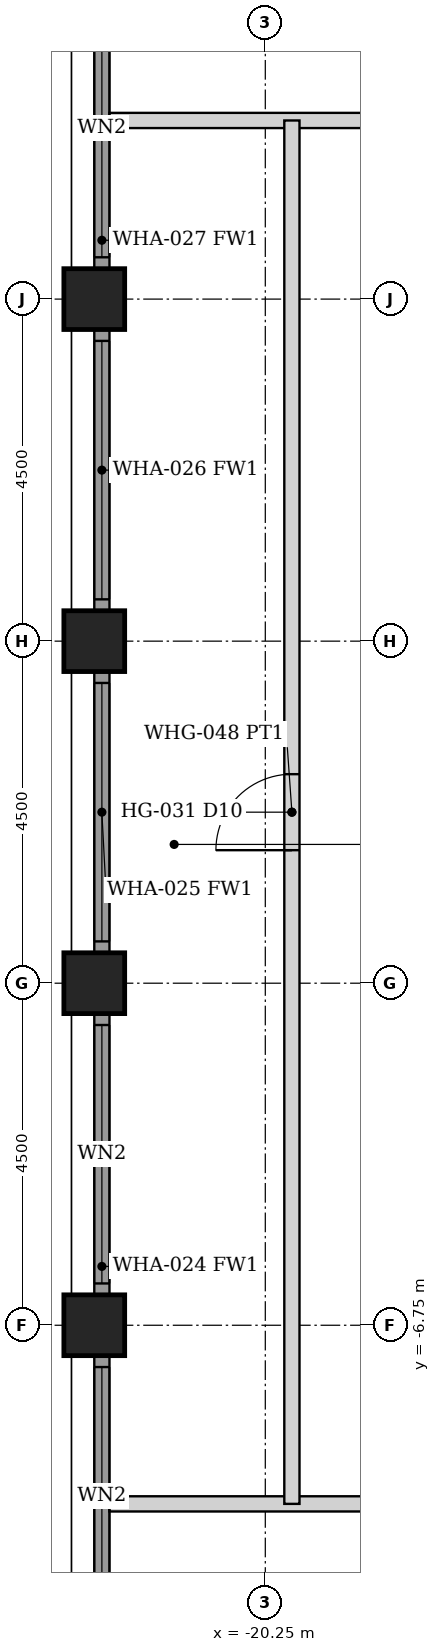
"""IFC4 building model, lengths in metres.
Left out: names, types, materials, properties, quantities, classifications, styles, units other than length and angle.
Written with IfcOpenShell. Run it as: python <this file> out.ifc"""

import sys

from ifc_helpers import new_model, si_unit, direction, frame, frame_2d, origin, origin_2d, place, context, subcontext, project, spatial, rectangle, hollow_rectangle, extrude, element, fill, save


model = new_model("IFC4")
c1 = context("Model", 3, precision=1e-05, world=origin(), true_north=direction((0.0, 1.0)))
c2 = subcontext(c1, "Body", "Model", "MODEL_VIEW")
j1 = project(units=[si_unit("LENGTHUNIT", "METRE"), si_unit("PLANEANGLEUNIT", "RADIAN")], contexts=[c1])
p1 = place(None, origin())
s1 = spatial("IfcSite", under=j1, at=p1, CompositionType="ELEMENT")
p2 = place(p1, origin())
s2 = spatial("IfcBuilding", under=s1, at=p2, CompositionType="ELEMENT")
p3 = place(p2, frame((0.0, 0.0, 183.2)))
s3 = spatial("IfcBuildingStorey", under=s2, at=p3, CompositionType="ELEMENT", Elevation=183.2)
for number, where, z_axis, x_axis in (
    (1, (-22.5, -6.75, 0.0), (0.0, 0.0, 1.0), (1.0, 0.0, 0.0)),
    (2, (-22.5, -2.25, 0.0), (0.0, 0.0, 1.0), (1.0, 0.0, 0.0)),
    (3, (-22.5, 2.25, 0.0), (0.0, 0.0, 1.0), (1.0, 0.0, 0.0)),
    (4, (-22.5, 6.75, 0.0), (0.0, 0.0, 1.0), (1.0, 0.0, 0.0)),
):
    element("IfcColumn", number, at=place(p3, frame(where, z_axis=z_axis, x_axis=x_axis)), inside=s3, PredefinedType="COLUMN", context=c2, shape_type="SweptSolid", body=[
        extrude(hollow_rectangle(XDim=0.8, YDim=0.8, WallThickness=0.045, at=origin_2d()), origin(), (0.0, 0.0, 1.0), 3.6),
    ])
p4 = place(p3, frame((-22.4, -10.845, 0.0), z_axis=(0.0, 0.0, 1.0), x_axis=(0.0, 1.0, 0.0)))
e5 = element("IfcWall", 5, at=p4, inside=s3, PredefinedType="SOLIDWALL", context=c2, shape_type="SweptSolid", body=[
    extrude(rectangle(XDim=3.69, YDim=0.2, at=frame_2d((1.845, 0.0))), origin(), (0.0, 0.0, 1.0), 2.479),
])
p5 = place(p4, frame((0.145, 0.0, 0.3)))
e6 = element("IfcOpeningElement", 6, at=p5, cuts=e5, PredefinedType="OPENING", context=c2, shape_type="SweptSolid", body=[
    extrude(rectangle(XDim=3.4, YDim=2.029, at=frame_2d((1.7, 1.015))), frame((0.0, 0.11, 0.0), z_axis=(0.0, -1.0, 0.0), x_axis=(1.0, 0.0, 0.0)), (0.0, 0.0, 1.0), 0.22),
])
p6 = place(p3, frame((-22.4, -6.345, 0.0), z_axis=(0.0, 0.0, 1.0), x_axis=(0.0, 1.0, 0.0)))
e7 = element("IfcWall", 7, at=p6, inside=s3, PredefinedType="SOLIDWALL", context=c2, shape_type="SweptSolid", body=[
    extrude(rectangle(XDim=3.69, YDim=0.2, at=frame_2d((1.845, 0.0))), origin(), (0.0, 0.0, 1.0), 2.479),
])
p7 = place(p6, frame((0.145, 0.0, 0.3)))
e8 = element("IfcOpeningElement", 8, at=p7, cuts=e7, PredefinedType="OPENING", context=c2, shape_type="SweptSolid", body=[
    extrude(rectangle(XDim=3.4, YDim=2.029, at=frame_2d((1.7, 1.015))), frame((0.0, 0.11, 0.0), z_axis=(0.0, -1.0, 0.0), x_axis=(1.0, 0.0, 0.0)), (0.0, 0.0, 1.0), 0.22),
])
p8 = place(p3, frame((-22.4, -1.845, 0.0), z_axis=(0.0, 0.0, 1.0), x_axis=(0.0, 1.0, 0.0)))
e9 = element("IfcWall", 9, at=p8, inside=s3, PredefinedType="SOLIDWALL", context=c2, shape_type="SweptSolid", body=[
    extrude(rectangle(XDim=3.69, YDim=0.2, at=frame_2d((1.845, 0.0))), origin(), (0.0, 0.0, 1.0), 2.479),
])
p9 = place(p8, frame((0.145, 0.0, 0.3)))
e10 = element("IfcOpeningElement", 10, at=p9, cuts=e9, PredefinedType="OPENING", context=c2, shape_type="SweptSolid", body=[
    extrude(rectangle(XDim=3.4, YDim=2.029, at=frame_2d((1.7, 1.015))), frame((0.0, 0.11, 0.0), z_axis=(0.0, -1.0, 0.0), x_axis=(1.0, 0.0, 0.0)), (0.0, 0.0, 1.0), 0.22),
])
p10 = place(p3, frame((-22.4, 2.655, 0.0), z_axis=(0.0, 0.0, 1.0), x_axis=(0.0, 1.0, 0.0)))
e11 = element("IfcWall", 11, at=p10, inside=s3, PredefinedType="SOLIDWALL", context=c2, shape_type="SweptSolid", body=[
    extrude(rectangle(XDim=3.69, YDim=0.2, at=frame_2d((1.845, 0.0))), origin(), (0.0, 0.0, 1.0), 2.479),
])
p11 = place(p10, frame((0.145, 0.0, 0.3)))
e12 = element("IfcOpeningElement", 12, at=p11, cuts=e11, PredefinedType="OPENING", context=c2, shape_type="SweptSolid", body=[
    extrude(rectangle(XDim=3.4, YDim=2.029, at=frame_2d((1.7, 1.015))), frame((0.0, 0.11, 0.0), z_axis=(0.0, -1.0, 0.0), x_axis=(1.0, 0.0, 0.0)), (0.0, 0.0, 1.0), 0.22),
])
p12 = place(p3, frame((-22.4, 7.155, 0.0), z_axis=(0.0, 0.0, 1.0), x_axis=(0.0, 1.0, 0.0)))
e13 = element("IfcWall", 13, at=p12, inside=s3, PredefinedType="SOLIDWALL", context=c2, shape_type="SweptSolid", body=[
    extrude(rectangle(XDim=3.69, YDim=0.2, at=frame_2d((1.845, 0.0))), origin(), (0.0, 0.0, 1.0), 2.479),
])
p13 = place(p12, frame((0.145, 0.0, 0.3)))
e14 = element("IfcOpeningElement", 14, at=p13, cuts=e13, PredefinedType="OPENING", context=c2, shape_type="SweptSolid", body=[
    extrude(rectangle(XDim=3.4, YDim=2.029, at=frame_2d((1.7, 1.015))), frame((0.0, 0.11, 0.0), z_axis=(0.0, -1.0, 0.0), x_axis=(1.0, 0.0, 0.0)), (0.0, 0.0, 1.0), 0.22),
])
p14 = place(p3, frame((-22.3, 9.1, 0.0), z_axis=(0.0, 0.0, 1.0), x_axis=(1.0, 0.0, 0.0)))
e15 = element("IfcWall", 15, at=p14, inside=s3, PredefinedType="PARTITIONING", context=c2, shape_type="SweptSolid", body=[
    extrude(rectangle(XDim=44.6, YDim=0.2, at=frame_2d((22.3, 0.0))), origin(), (0.0, 0.0, 1.0), 2.473),
])
p15 = place(p14, frame((11.35, 0.0, 0.0)))
e16 = element("IfcOpeningElement", 16, at=p15, cuts=e15, PredefinedType="OPENING", context=c2, shape_type="SweptSolid", body=[
    extrude(rectangle(XDim=0.9, YDim=2.1, at=frame_2d((0.45, 1.05))), frame((0.0, 0.11, 0.0), z_axis=(0.0, -1.0, 0.0), x_axis=(1.0, 0.0, 0.0)), (0.0, 0.0, 1.0), 0.22),
])
p16 = place(p14, frame((15.75, 0.0, 0.0)))
e17 = element("IfcOpeningElement", 17, at=p16, cuts=e15, PredefinedType="OPENING", context=c2, shape_type="SweptSolid", body=[
    extrude(rectangle(XDim=0.9, YDim=2.1, at=frame_2d((0.45, 1.05))), frame((0.0, 0.11, 0.0), z_axis=(0.0, -1.0, 0.0), x_axis=(1.0, 0.0, 0.0)), (0.0, 0.0, 1.0), 0.22),
])
p17 = place(p14, frame((23.45, 0.0, 0.0)))
e18 = element("IfcOpeningElement", 18, at=p17, cuts=e15, PredefinedType="OPENING", context=c2, shape_type="SweptSolid", body=[
    extrude(rectangle(XDim=0.9, YDim=2.1, at=frame_2d((0.45, 1.05))), frame((0.0, 0.11, 0.0), z_axis=(0.0, -1.0, 0.0), x_axis=(1.0, 0.0, 0.0)), (0.0, 0.0, 1.0), 0.22),
])
p18 = place(p14, frame((24.75, 0.0, 0.0)))
e19 = element("IfcOpeningElement", 19, at=p18, cuts=e15, PredefinedType="OPENING", context=c2, shape_type="SweptSolid", body=[
    extrude(rectangle(XDim=0.9, YDim=2.1, at=frame_2d((0.45, 1.05))), frame((0.0, 0.11, 0.0), z_axis=(0.0, -1.0, 0.0), x_axis=(1.0, 0.0, 0.0)), (0.0, 0.0, 1.0), 0.22),
])
p19 = place(p14, frame((29.35, 0.0, 0.0)))
e20 = element("IfcOpeningElement", 20, at=p19, cuts=e15, PredefinedType="OPENING", context=c2, shape_type="SweptSolid", body=[
    extrude(rectangle(XDim=0.9, YDim=2.1, at=frame_2d((0.45, 1.05))), frame((0.0, 0.11, 0.0), z_axis=(0.0, -1.0, 0.0), x_axis=(1.0, 0.0, 0.0)), (0.0, 0.0, 1.0), 0.22),
])
p20 = place(p14, frame((38.85, 0.0, 0.0)))
e21 = element("IfcOpeningElement", 21, at=p20, cuts=e15, PredefinedType="OPENING", context=c2, shape_type="SweptSolid", body=[
    extrude(rectangle(XDim=0.9, YDim=2.1, at=frame_2d((0.45, 1.05))), frame((0.0, 0.11, 0.0), z_axis=(0.0, -1.0, 0.0), x_axis=(1.0, 0.0, 0.0)), (0.0, 0.0, 1.0), 0.22),
])
p21 = place(p14, frame((4.85, 0.0, 0.0)))
e22 = element("IfcOpeningElement", 22, at=p21, cuts=e15, PredefinedType="OPENING", context=c2, shape_type="SweptSolid", body=[
    extrude(rectangle(XDim=0.9, YDim=2.1, at=frame_2d((0.45, 1.05))), frame((0.0, 0.11, 0.0), z_axis=(0.0, -1.0, 0.0), x_axis=(1.0, 0.0, 0.0)), (0.0, 0.0, 1.0), 0.22),
])
p22 = place(p3, frame((-22.3, -9.1, 0.0), z_axis=(0.0, 0.0, 1.0), x_axis=(1.0, 0.0, 0.0)))
e23 = element("IfcWall", 23, at=p22, inside=s3, PredefinedType="PARTITIONING", context=c2, shape_type="SweptSolid", body=[
    extrude(rectangle(XDim=44.6, YDim=0.2, at=frame_2d((22.3, 0.0))), origin(), (0.0, 0.0, 1.0), 2.473),
])
p23 = place(p22, frame((11.35, 0.0, 0.0)))
e24 = element("IfcOpeningElement", 24, at=p23, cuts=e23, PredefinedType="OPENING", context=c2, shape_type="SweptSolid", body=[
    extrude(rectangle(XDim=0.9, YDim=2.1, at=frame_2d((0.45, 1.05))), frame((0.0, 0.11, 0.0), z_axis=(0.0, -1.0, 0.0), x_axis=(1.0, 0.0, 0.0)), (0.0, 0.0, 1.0), 0.22),
])
p24 = place(p22, frame((15.75, 0.0, 0.0)))
e25 = element("IfcOpeningElement", 25, at=p24, cuts=e23, PredefinedType="OPENING", context=c2, shape_type="SweptSolid", body=[
    extrude(rectangle(XDim=0.9, YDim=2.1, at=frame_2d((0.45, 1.05))), frame((0.0, 0.11, 0.0), z_axis=(0.0, -1.0, 0.0), x_axis=(1.0, 0.0, 0.0)), (0.0, 0.0, 1.0), 0.22),
])
p25 = place(p22, frame((23.45, 0.0, 0.0)))
e26 = element("IfcOpeningElement", 26, at=p25, cuts=e23, PredefinedType="OPENING", context=c2, shape_type="SweptSolid", body=[
    extrude(rectangle(XDim=0.9, YDim=2.1, at=frame_2d((0.45, 1.05))), frame((0.0, 0.11, 0.0), z_axis=(0.0, -1.0, 0.0), x_axis=(1.0, 0.0, 0.0)), (0.0, 0.0, 1.0), 0.22),
])
p26 = place(p22, frame((24.75, 0.0, 0.0)))
e27 = element("IfcOpeningElement", 27, at=p26, cuts=e23, PredefinedType="OPENING", context=c2, shape_type="SweptSolid", body=[
    extrude(rectangle(XDim=0.9, YDim=2.1, at=frame_2d((0.45, 1.05))), frame((0.0, 0.11, 0.0), z_axis=(0.0, -1.0, 0.0), x_axis=(1.0, 0.0, 0.0)), (0.0, 0.0, 1.0), 0.22),
])
p27 = place(p22, frame((29.25, 0.0, 0.0)))
e28 = element("IfcOpeningElement", 28, at=p27, cuts=e23, PredefinedType="OPENING", context=c2, shape_type="SweptSolid", body=[
    extrude(rectangle(XDim=0.9, YDim=2.1, at=frame_2d((0.45, 1.05))), frame((0.0, 0.11, 0.0), z_axis=(0.0, -1.0, 0.0), x_axis=(1.0, 0.0, 0.0)), (0.0, 0.0, 1.0), 0.22),
])
p28 = place(p22, frame((38.85, 0.0, 0.0)))
e29 = element("IfcOpeningElement", 29, at=p28, cuts=e23, PredefinedType="OPENING", context=c2, shape_type="SweptSolid", body=[
    extrude(rectangle(XDim=0.9, YDim=2.1, at=frame_2d((0.45, 1.05))), frame((0.0, 0.11, 0.0), z_axis=(0.0, -1.0, 0.0), x_axis=(1.0, 0.0, 0.0)), (0.0, 0.0, 1.0), 0.22),
])
p29 = place(p22, frame((4.85, 0.0, 0.0)))
e30 = element("IfcOpeningElement", 30, at=p29, cuts=e23, PredefinedType="OPENING", context=c2, shape_type="SweptSolid", body=[
    extrude(rectangle(XDim=0.9, YDim=2.1, at=frame_2d((0.45, 1.05))), frame((0.0, 0.11, 0.0), z_axis=(0.0, -1.0, 0.0), x_axis=(1.0, 0.0, 0.0)), (0.0, 0.0, 1.0), 0.22),
])
p30 = place(p3, frame((-19.9, -9.1, 0.0), z_axis=(0.0, 0.0, 1.0), x_axis=(0.0, 1.0, 0.0)))
e31 = element("IfcWall", 31, at=p30, inside=s3, PredefinedType="PARTITIONING", context=c2, shape_type="SweptSolid", body=[
    extrude(rectangle(XDim=18.2, YDim=0.2, at=frame_2d((9.1, 0.0))), origin(), (0.0, 0.0, 1.0), 2.473),
])
p31 = place(p30, frame((8.6, 0.0, 0.0)))
e32 = element("IfcOpeningElement", 32, at=p31, cuts=e31, PredefinedType="OPENING", context=c2, shape_type="SweptSolid", body=[
    extrude(rectangle(XDim=1.0, YDim=2.1, at=frame_2d((0.5, 1.05))), frame((0.0, 0.11, 0.0), z_axis=(0.0, -1.0, 0.0), x_axis=(1.0, 0.0, 0.0)), (0.0, 0.0, 1.0), 0.22),
])
p32 = place(p5, origin())
e33 = element("IfcWindow", 33, at=p32, inside=s3, PartitioningType="SINGLE_PANEL", PredefinedType="WINDOW", context=c2, shape_type="SweptSolid", body=[
    extrude(rectangle(XDim=3.4, YDim=2.029, at=frame_2d((1.7, 1.015))), frame((0.0, 0.03, 0.0), z_axis=(0.0, -1.0, 0.0), x_axis=(1.0, 0.0, 0.0)), (0.0, 0.0, 1.0), 0.06),
])
fill(e6, e33)
p33 = place(p7, origin())
e34 = element("IfcWindow", 34, at=p33, inside=s3, PartitioningType="SINGLE_PANEL", PredefinedType="WINDOW", context=c2, shape_type="SweptSolid", body=[
    extrude(rectangle(XDim=3.4, YDim=2.029, at=frame_2d((1.7, 1.015))), frame((0.0, 0.03, 0.0), z_axis=(0.0, -1.0, 0.0), x_axis=(1.0, 0.0, 0.0)), (0.0, 0.0, 1.0), 0.06),
])
fill(e8, e34)
p34 = place(p9, origin())
e35 = element("IfcWindow", 35, at=p34, inside=s3, PartitioningType="SINGLE_PANEL", PredefinedType="WINDOW", context=c2, shape_type="SweptSolid", body=[
    extrude(rectangle(XDim=3.4, YDim=2.029, at=frame_2d((1.7, 1.015))), frame((0.0, 0.03, 0.0), z_axis=(0.0, -1.0, 0.0), x_axis=(1.0, 0.0, 0.0)), (0.0, 0.0, 1.0), 0.06),
])
fill(e10, e35)
p35 = place(p11, origin())
e36 = element("IfcWindow", 36, at=p35, inside=s3, PartitioningType="SINGLE_PANEL", PredefinedType="WINDOW", context=c2, shape_type="SweptSolid", body=[
    extrude(rectangle(XDim=3.4, YDim=2.029, at=frame_2d((1.7, 1.015))), frame((0.0, 0.03, 0.0), z_axis=(0.0, -1.0, 0.0), x_axis=(1.0, 0.0, 0.0)), (0.0, 0.0, 1.0), 0.06),
])
fill(e12, e36)
p36 = place(p13, origin())
e37 = element("IfcWindow", 37, at=p36, inside=s3, PartitioningType="SINGLE_PANEL", PredefinedType="WINDOW", context=c2, shape_type="SweptSolid", body=[
    extrude(rectangle(XDim=3.4, YDim=2.029, at=frame_2d((1.7, 1.015))), frame((0.0, 0.03, 0.0), z_axis=(0.0, -1.0, 0.0), x_axis=(1.0, 0.0, 0.0)), (0.0, 0.0, 1.0), 0.06),
])
fill(e14, e37)
p37 = place(p31, origin())
e38 = element("IfcDoor", 38, at=p37, inside=s3, OperationType="SINGLE_SWING_LEFT", PredefinedType="DOOR", context=c2, shape_type="SweptSolid", body=[
    extrude(rectangle(XDim=1.0, YDim=2.1, at=frame_2d((0.5, 1.05))), frame((0.0, 0.025, 0.0), z_axis=(0.0, -1.0, 0.0), x_axis=(1.0, 0.0, 0.0)), (0.0, 0.0, 1.0), 0.05),
])
fill(e32, e38)
save(model, sys.argv[1])
